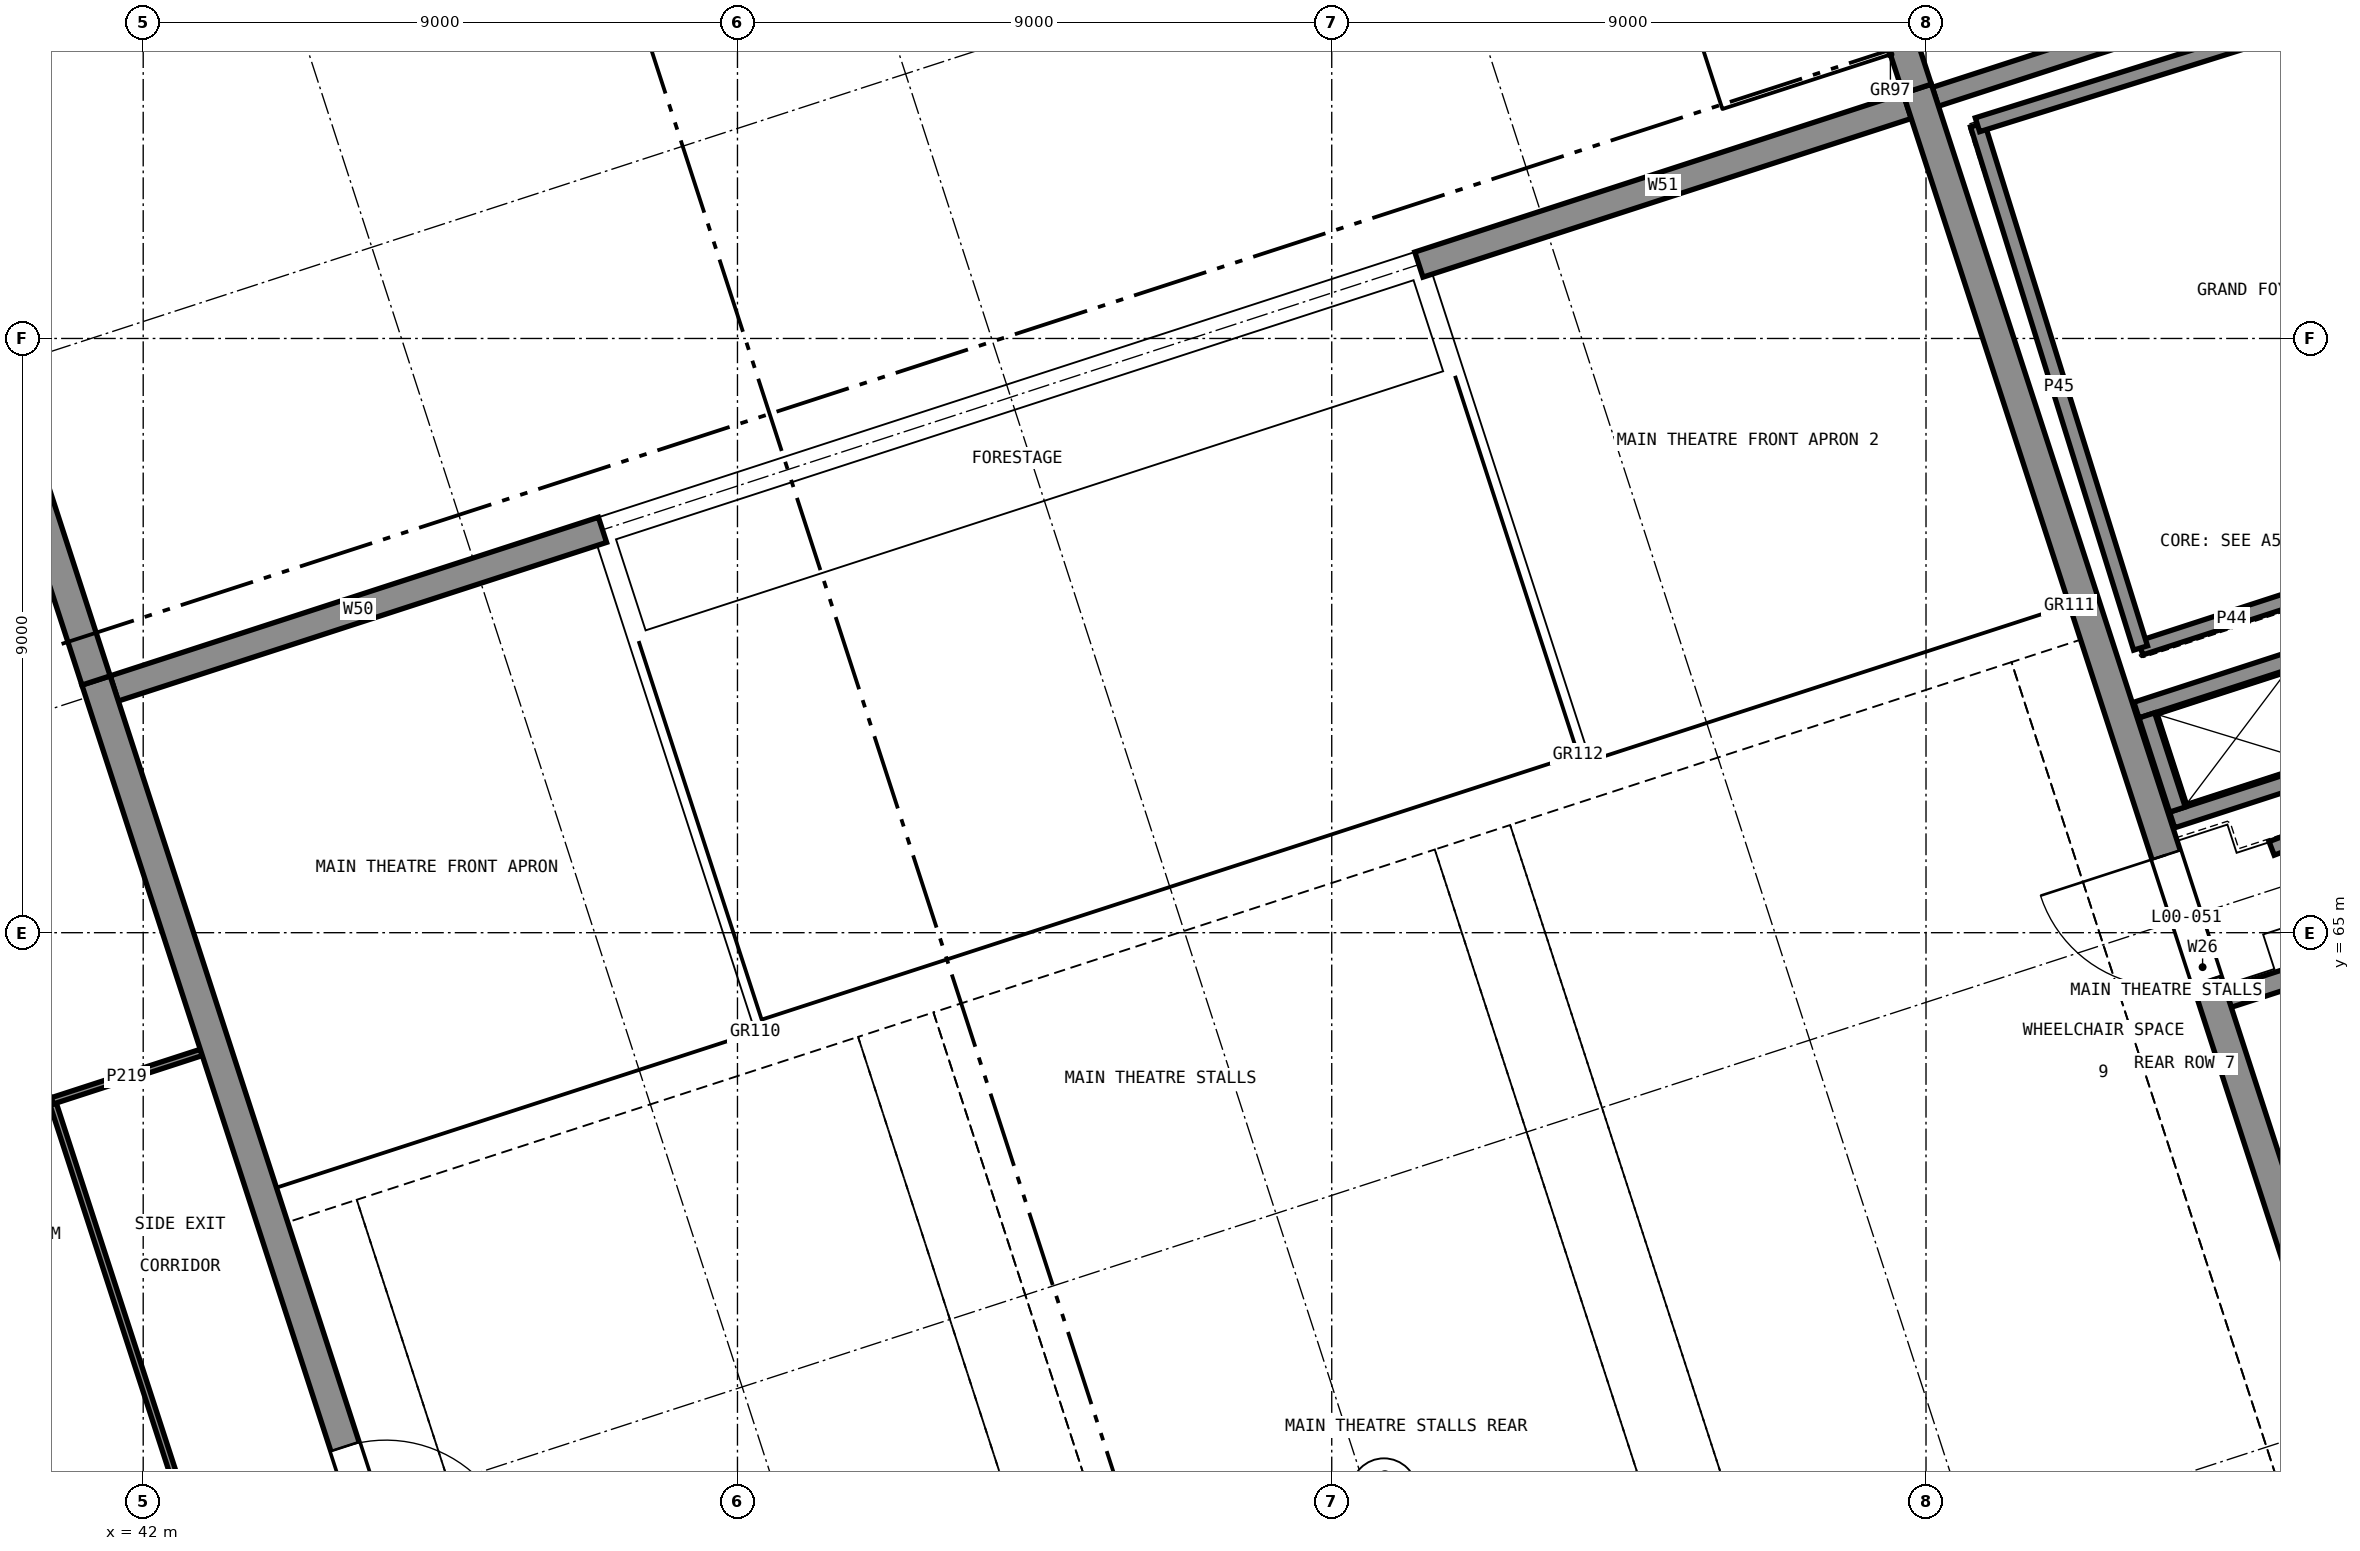
"""IFC4 building model, lengths in metres.
Left out: names, types, materials, properties, quantities, classifications, styles, units other than length and angle.
Written with IfcOpenShell. Run it as: python <this file> out.ifc"""

import sys

from ifc_helpers import new_model, si_unit, direction, frame, frame_2d, origin, place, context, subcontext, project, spatial, rectangle, extrude, element, fill, save


model = new_model("IFC4")
c1 = context("Model", 3, precision=1e-05, world=origin(), true_north=direction((0.0, 1.0)))
c2 = subcontext(c1, "Body", "Model", "MODEL_VIEW")
j1 = project(units=[si_unit("LENGTHUNIT", "METRE"), si_unit("PLANEANGLEUNIT", "RADIAN")], contexts=[c1])
p1 = place(None, origin())
s1 = spatial("IfcSite", under=j1, at=p1, CompositionType="ELEMENT")
p2 = place(p1, origin())
s2 = spatial("IfcBuilding", under=s1, at=p2, CompositionType="ELEMENT")
p3 = place(p2, origin())
s3 = spatial("IfcBuildingStorey", under=s2, at=p3, CompositionType="ELEMENT", Elevation=0.0)
p4 = place(p3, frame((49.93, 42.214, 0.0), z_axis=(0.0, 0.0, 1.0), x_axis=(-0.309016215614, 0.95105676933, 0.0)))
e1 = element("IfcWall", 1, at=p4, inside=s3, PredefinedType="SHEAR", context=c2, shape_type="SweptSolid", body=[
    extrude(rectangle(XDim=27.975, YDim=0.45, at=frame_2d((13.988, 0.0))), origin(), (0.0, 0.0, 1.0), 5.5),
])
p5 = place(p4, frame((13.775, 0.0, 0.0)))
e2 = element("IfcOpeningElement", 2, at=p5, cuts=e1, PredefinedType="OPENING", context=c2, shape_type="SweptSolid", body=[
    extrude(rectangle(XDim=2.0, YDim=2.4, at=frame_2d((1.0, 1.2))), frame((0.0, 0.235, 0.0), z_axis=(0.0, -1.0, 0.0), x_axis=(1.0, 0.0, 0.0)), (0.0, 0.0, 1.0), 0.47),
])
p6 = place(p3, frame((77.511, 51.176, 0.0), z_axis=(0.0, 0.0, 1.0), x_axis=(-0.309018780445, 0.951055935964, 0.0)))
e3 = element("IfcWall", 3, at=p6, inside=s3, PredefinedType="SHEAR", context=c2, shape_type="SweptSolid", body=[
    extrude(rectangle(XDim=27.975, YDim=0.45, at=frame_2d((13.987, 0.0))), origin(), (0.0, 0.0, 1.0), 5.5),
])
p7 = place(p6, frame((13.775, 0.0, 0.0)))
e4 = element("IfcOpeningElement", 4, at=p7, cuts=e3, PredefinedType="OPENING", context=c2, shape_type="SweptSolid", body=[
    extrude(rectangle(XDim=2.0, YDim=2.4, at=frame_2d((1.0, 1.2))), frame((0.0, 0.235, 0.0), z_axis=(0.0, -1.0, 0.0), x_axis=(1.0, 0.0, 0.0)), (0.0, 0.0, 1.0), 0.47),
])
p8 = place(p3, frame((41.286, 68.82, 0.0), z_axis=(0.0, 0.0, 1.0), x_axis=(-0.309008517326, 0.951059270613, 0.0)))
e5 = element("IfcWall", 5, at=p8, inside=s3, PredefinedType="SHEAR", context=c2, shape_type="SweptSolid", body=[
    extrude(rectangle(XDim=19.575, YDim=0.45, at=frame_2d((9.788, 0.0))), origin(), (0.0, 0.0, 1.0), 5.5),
])
p9 = place(p8, frame((7.4, 0.0, 0.0)))
e6 = element("IfcOpeningElement", 6, at=p9, cuts=e5, PredefinedType="OPENING", context=c2, shape_type="SweptSolid", body=[
    extrude(rectangle(XDim=4.8, YDim=4.5, at=frame_2d((2.4, 2.25))), frame((0.0, 0.235, 0.0), z_axis=(0.0, -1.0, 0.0), x_axis=(1.0, 0.0, 0.0)), (0.0, 0.0, 1.0), 0.47),
])
p10 = place(p3, frame((68.866, 77.781, 0.0), z_axis=(0.0, 0.0, 1.0), x_axis=(-0.309019798438, 0.951055605195, 0.0)))
e7 = element("IfcWall", 7, at=p10, inside=s3, PredefinedType="SHEAR", context=c2, shape_type="SweptSolid", body=[
    extrude(rectangle(XDim=19.575, YDim=0.45, at=frame_2d((9.788, 0.0))), origin(), (0.0, 0.0, 1.0), 5.5),
])
p11 = place(p10, frame((7.3, 0.0, 0.0)))
e8 = element("IfcOpeningElement", 8, at=p11, cuts=e7, PredefinedType="OPENING", context=c2, shape_type="SweptSolid", body=[
    extrude(rectangle(XDim=5.0, YDim=4.5, at=frame_2d((2.5, 2.25))), frame((0.0, 0.235, 0.0), z_axis=(0.0, -1.0, 0.0), x_axis=(1.0, 0.0, 0.0)), (0.0, 0.0, 1.0), 0.47),
])
p12 = place(p3, frame((41.562, 68.699, 0.0), z_axis=(0.0, 0.0, 1.0), x_axis=(0.95105806443, 0.309012229664, 0.0)))
e9 = element("IfcWall", 9, at=p12, inside=s3, PredefinedType="SHEAR", context=c2, shape_type="SweptSolid", body=[
    extrude(rectangle(XDim=7.775, YDim=0.4, at=frame_2d((3.888, 0.0))), origin(), (0.0, 0.0, 1.0), 5.5),
])
p13 = place(p3, frame((61.32, 75.119, 0.0), z_axis=(0.0, 0.0, 1.0), x_axis=(0.951055065909, 0.30902145817, 0.0)))
e10 = element("IfcWall", 10, at=p13, inside=s3, PredefinedType="SHEAR", context=c2, shape_type="SweptSolid", body=[
    extrude(rectangle(XDim=7.775, YDim=0.4, at=frame_2d((3.887, 0.0))), origin(), (0.0, 0.0, 1.0), 5.5),
])
p14 = place(p3, frame((69.142, 77.661, 0.0), z_axis=(0.0, 0.0, 1.0), x_axis=(0.95105497274, 0.30902174491, 0.0)))
e11 = element("IfcWall", 11, at=p14, inside=s3, PredefinedType="SOLIDWALL", context=c2, shape_type="SweptSolid", body=[
    extrude(rectangle(XDim=8.925, YDim=0.3, at=frame_2d((4.462, 0.0))), origin(), (0.0, 0.0, 1.0), 5.5),
])
p15 = place(p3, frame((80.305, 66.199, 0.0), z_axis=(0.0, 0.0, 1.0), x_axis=(-0.951054354327, -0.309023648149, 0.0)))
e12 = element("IfcWall", 12, at=p15, inside=s3, PredefinedType="SOLIDWALL", context=c2, shape_type="SweptSolid", body=[
    extrude(rectangle(XDim=7.075, YDim=0.3, at=frame_2d((3.537, 0.0))), origin(), (0.0, 0.0, 1.0), 5.2),
])
for number, where, z_axis, x_axis in (
    (13, (72.727, 66.708, -1.5), (0.0, 0.0, 1.0), (0.951, 0.309, 0.0)),
    (14, (74.659, 69.175, -1.5), (0.0, 0.0, 1.0), (-0.951, -0.309, 0.0)),
):
    element("IfcWall", number, at=place(p3, frame(where, z_axis=z_axis, x_axis=x_axis)), inside=s3, PredefinedType="SHEAR", context=c2, shape_type="SweptSolid", body=[
        extrude(rectangle(XDim=2.6, YDim=0.25, at=frame_2d((1.3, 0.0))), origin(), (0.0, 0.0, 1.0), 7.0),
    ])
p16 = place(p3, frame((72.344, 68.292, -1.5), z_axis=(0.0, 0.0, 1.0), x_axis=(0.309089752708, -0.951032872603, 0.0)))
e15 = element("IfcWall", 15, at=p16, inside=s3, PredefinedType="SHEAR", context=c2, shape_type="SweptSolid", body=[
    extrude(rectangle(XDim=1.5, YDim=0.25, at=frame_2d((0.75, 0.0))), origin(), (0.0, 0.0, 1.0), 7.0),
])
p17 = place(p3, frame((74.234, 66.277, 0.0), z_axis=(0.0, 0.0, 1.0), x_axis=(0.934839656158, 0.355070158243, 0.0)))
e16 = element("IfcWall", 16, at=p17, inside=s3, PredefinedType="SOLIDWALL", context=c2, shape_type="SweptSolid", body=[
    extrude(rectangle(XDim=2.052, YDim=0.22, at=frame_2d((1.026, 0.0))), origin(), (0.0, 0.0, 1.0), 5.2),
])
p18 = place(p3, frame((75.007, 70.208, 0.0), z_axis=(0.0, 0.0, 1.0), x_axis=(-0.951047059821, -0.309046096893, 0.0)))
e17 = element("IfcWall", 17, at=p18, inside=s3, PredefinedType="SOLIDWALL", context=c2, shape_type="SweptSolid", body=[
    extrude(rectangle(XDim=2.9, YDim=0.22, at=frame_2d((1.45, 0.0))), origin(), (0.0, 0.0, 1.0), 5.2),
])
p19 = place(p3, frame((72.249, 69.312, 0.0), z_axis=(0.0, 0.0, 1.0), x_axis=(-0.297531334915, 0.954712053314, 0.0)))
e18 = element("IfcWall", 18, at=p19, inside=s3, PredefinedType="SOLIDWALL", context=c2, shape_type="SweptSolid", body=[
    extrude(rectangle(XDim=8.301, YDim=0.22, at=frame_2d((4.15, 0.0))), origin(), (0.0, 0.0, 1.0), 5.2),
])
p20 = place(p3, frame((69.779, 77.237, 0.0), z_axis=(0.0, 0.0, 1.0), x_axis=(0.954435963037, 0.298415804646, 0.0)))
e19 = element("IfcWall", 19, at=p20, inside=s3, PredefinedType="SOLIDWALL", context=c2, shape_type="SweptSolid", body=[
    extrude(rectangle(XDim=8.885, YDim=0.22, at=frame_2d((4.442, 0.0))), origin(), (0.0, 0.0, 1.0), 5.2),
])
p21 = place(p3, frame((36.683, 61.173, 0.0), z_axis=(0.0, 0.0, 1.0), x_axis=(0.95105616864, 0.309018064344, 0.0)))
e20 = element("IfcWall", 20, at=p21, inside=s3, PredefinedType="PARTITIONING", context=c2, shape_type="SweptSolid", body=[
    extrude(rectangle(XDim=4.14, YDim=0.1, at=frame_2d((2.07, 0.0))), origin(), (0.0, 0.0, 1.0), 5.2),
])
p22 = place(p3, frame((40.621, 62.453, 0.0), z_axis=(0.0, 0.0, 1.0), x_axis=(0.951061260164, 0.309002393867, 0.0)))
e21 = element("IfcWall", 21, at=p22, inside=s3, PredefinedType="PARTITIONING", context=c2, shape_type="SweptSolid", body=[
    extrude(rectangle(XDim=2.375, YDim=0.1, at=frame_2d((1.188, 0.0))), origin(), (0.0, 0.0, 1.0), 5.2),
])
p23 = place(p3, frame((44.341, 51.002, 0.0), z_axis=(0.0, 0.0, 1.0), x_axis=(-0.309016547708, 0.951056661426, 0.0)))
e22 = element("IfcWall", 22, at=p23, inside=s3, PredefinedType="PARTITIONING", context=c2, shape_type="SweptSolid", body=[
    extrude(rectangle(XDim=11.99, YDim=0.1, at=frame_2d((5.995, 0.0))), origin(), (0.0, 0.0, 1.0), 5.2),
])
p24 = place(p5, frame((2.0, 0.0, 0.0), z_axis=(0.0, 0.0, 1.0), x_axis=(-1.0, 0.0, 0.0)))
e23 = element("IfcDoor", 23, at=p24, inside=s3, OperationType="DOUBLE_DOOR_SINGLE_SWING", PredefinedType="DOOR", context=c2, shape_type="SweptSolid", body=[
    extrude(rectangle(XDim=2.0, YDim=2.4, at=frame_2d((1.0, 1.2))), frame((0.0, 0.025, 0.0), z_axis=(0.0, -1.0, 0.0), x_axis=(1.0, 0.0, 0.0)), (0.0, 0.0, 1.0), 0.05),
])
fill(e2, e23)
p25 = place(p7, origin())
e24 = element("IfcDoor", 24, at=p25, inside=s3, OperationType="DOUBLE_DOOR_SINGLE_SWING", PredefinedType="DOOR", context=c2, shape_type="SweptSolid", body=[
    extrude(rectangle(XDim=2.0, YDim=2.4, at=frame_2d((1.0, 1.2))), frame((0.0, 0.025, 0.0), z_axis=(0.0, -1.0, 0.0), x_axis=(1.0, 0.0, 0.0)), (0.0, 0.0, 1.0), 0.05),
])
fill(e4, e24)
save(model, sys.argv[1])
